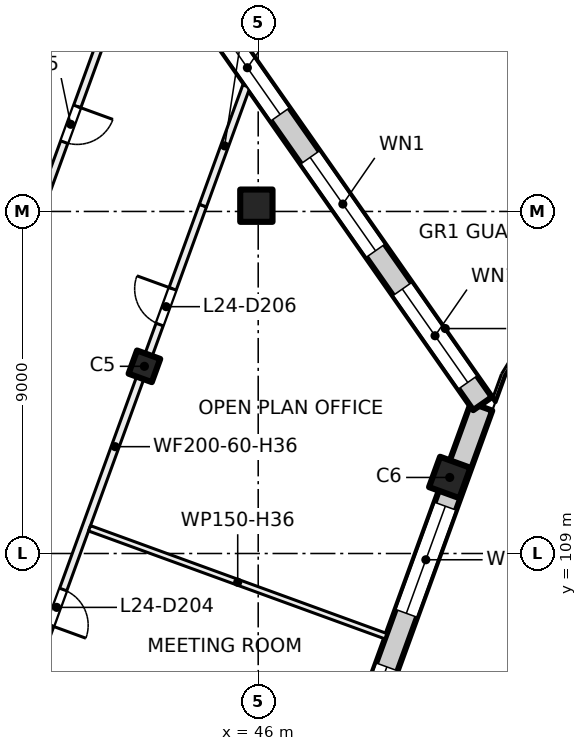
"""IFC4 building model, lengths in metres.
Left out: names, types, materials, properties, quantities, classifications, styles, units other than length and angle.
Written with IfcOpenShell. Run it as: python <this file> out.ifc"""

import sys

from ifc_helpers import new_model, si_unit, direction, frame, frame_2d, origin, origin_2d, place, context, subcontext, project, spatial, rectangle, extrude, element, fill, save


model = new_model("IFC4")
c1 = context("Model", 3, precision=1e-05, world=origin(), true_north=direction((0.0, 1.0)))
c2 = subcontext(c1, "Body", "Model", "MODEL_VIEW")
j1 = project(units=[si_unit("LENGTHUNIT", "METRE"), si_unit("PLANEANGLEUNIT", "RADIAN")], contexts=[c1])
p1 = place(None, origin())
s1 = spatial("IfcSite", under=j1, at=p1, CompositionType="ELEMENT")
p2 = place(p1, origin())
s2 = spatial("IfcBuilding", under=s1, at=p2, CompositionType="ELEMENT")
p3 = place(p2, frame((0.0, 0.0, 105.0)))
s3 = spatial("IfcBuildingStorey", under=s2, at=p3, CompositionType="ELEMENT", Elevation=105.0)
p4 = place(p3, frame((45.952, 118.152, 0.0), z_axis=(0.0, 0.0, 1.0), x_axis=(1.0, 0.0, 0.0)))
e1 = element("IfcColumn", 1, at=p4, inside=s3, PredefinedType="COLUMN", context=c2, shape_type="SweptSolid", body=[
    extrude(rectangle(XDim=0.85, YDim=0.85, at=origin_2d()), origin(), (0.0, 0.0, 1.0), 4.0),
])
p5 = place(p3, frame((43.006, 113.925, 0.0), z_axis=(0.0, 0.0, 1.0), x_axis=(-0.342020143326, -0.939692620786, 0.0)))
e2 = element("IfcColumn", 2, at=p5, inside=s3, PredefinedType="COLUMN", context=c2, shape_type="SweptSolid", body=[
    extrude(rectangle(XDim=0.65, YDim=0.65, at=origin_2d()), origin(), (0.0, 0.0, 1.0), 4.0),
])
p6 = place(p3, frame((51.04, 111.001, 0.0), z_axis=(0.0, 0.0, 1.0), x_axis=(-0.342020143326, -0.939692620786, 0.0)))
e3 = element("IfcColumn", 3, at=p6, inside=s3, PredefinedType="COLUMN", context=c2, shape_type="SweptSolid", body=[
    extrude(rectangle(XDim=0.85, YDim=0.85, at=origin_2d()), origin(), (0.0, 0.0, 1.0), 4.0),
])
p7 = place(p3, frame((58.083, 117.369, 0.0), z_axis=(0.0, 0.0, 1.0), x_axis=(-0.573573095716, 0.819154383416, 0.0)))
e4 = element("IfcWall", 4, at=p7, inside=s3, PredefinedType="SOLIDWALL", context=c2, shape_type="SweptSolid", body=[
    extrude(rectangle(XDim=26.037, YDim=0.6, at=frame_2d((13.019, 0.0))), origin(), (0.0, 0.0, 1.0), 3.625),
])
p8 = place(p7, frame((1.05, 0.0, 0.0)))
e5 = element("IfcOpeningElement", 5, at=p8, cuts=e4, PredefinedType="OPENING", context=c2, shape_type="SweptSolid", body=[
    extrude(rectangle(XDim=1.8, YDim=2.4, at=frame_2d((0.9, 1.2))), frame((0.0, 0.31, 0.0), z_axis=(0.0, -1.0, 0.0), x_axis=(1.0, 0.0, 0.0)), (0.0, 0.0, 1.0), 0.62),
])
p9 = place(p7, frame((4.829, 0.0, 0.9)))
e6 = element("IfcOpeningElement", 6, at=p9, cuts=e4, PredefinedType="OPENING", context=c2, shape_type="SweptSolid", body=[
    extrude(rectangle(XDim=3.0, YDim=2.4, at=frame_2d((1.5, 1.2))), frame((0.0, 0.31, 0.0), z_axis=(0.0, -1.0, 0.0), x_axis=(1.0, 0.0, 0.0)), (0.0, 0.0, 1.0), 0.62),
])
p10 = place(p7, frame((9.209, 0.0, 0.9)))
e7 = element("IfcOpeningElement", 7, at=p10, cuts=e4, PredefinedType="OPENING", context=c2, shape_type="SweptSolid", body=[
    extrude(rectangle(XDim=3.0, YDim=2.4, at=frame_2d((1.5, 1.2))), frame((0.0, 0.31, 0.0), z_axis=(0.0, -1.0, 0.0), x_axis=(1.0, 0.0, 0.0)), (0.0, 0.0, 1.0), 0.62),
])
p11 = place(p7, frame((13.588, 0.0, 0.9)))
e8 = element("IfcOpeningElement", 8, at=p11, cuts=e4, PredefinedType="OPENING", context=c2, shape_type="SweptSolid", body=[
    extrude(rectangle(XDim=3.0, YDim=2.4, at=frame_2d((1.5, 1.2))), frame((0.0, 0.31, 0.0), z_axis=(0.0, -1.0, 0.0), x_axis=(1.0, 0.0, 0.0)), (0.0, 0.0, 1.0), 0.62),
])
p12 = place(p7, frame((17.968, 0.0, 0.9)))
e9 = element("IfcOpeningElement", 9, at=p12, cuts=e4, PredefinedType="OPENING", context=c2, shape_type="SweptSolid", body=[
    extrude(rectangle(XDim=3.0, YDim=2.4, at=frame_2d((1.5, 1.2))), frame((0.0, 0.31, 0.0), z_axis=(0.0, -1.0, 0.0), x_axis=(1.0, 0.0, 0.0)), (0.0, 0.0, 1.0), 0.62),
])
p13 = place(p7, frame((22.198, 0.0, 0.9)))
e10 = element("IfcOpeningElement", 10, at=p13, cuts=e4, PredefinedType="OPENING", context=c2, shape_type="SweptSolid", body=[
    extrude(rectangle(XDim=3.0, YDim=2.4, at=frame_2d((1.5, 1.2))), frame((0.0, 0.31, 0.0), z_axis=(0.0, -1.0, 0.0), x_axis=(1.0, 0.0, 0.0)), (0.0, 0.0, 1.0), 0.62),
])
p14 = place(p3, frame((51.877, 112.862, 0.0), z_axis=(0.0, 0.0, 1.0), x_axis=(-0.342020589714, -0.939692458314, 0.0)))
e11 = element("IfcWall", 11, at=p14, inside=s3, PredefinedType="SOLIDWALL", context=c2, shape_type="SweptSolid", body=[
    extrude(rectangle(XDim=20.765, YDim=0.6, at=frame_2d((10.382, 0.0))), origin(), (0.0, 0.0, 1.0), 3.625),
])
p15 = place(p14, frame((2.785, 0.0, 0.9)))
e12 = element("IfcOpeningElement", 12, at=p15, cuts=e11, PredefinedType="OPENING", context=c2, shape_type="SweptSolid", body=[
    extrude(rectangle(XDim=3.0, YDim=2.4, at=frame_2d((1.5, 1.2))), frame((0.0, 0.31, 0.0), z_axis=(0.0, -1.0, 0.0), x_axis=(1.0, 0.0, 0.0)), (0.0, 0.0, 1.0), 0.62),
])
p16 = place(p14, frame((7.285, 0.0, 0.9)))
e13 = element("IfcOpeningElement", 13, at=p16, cuts=e11, PredefinedType="OPENING", context=c2, shape_type="SweptSolid", body=[
    extrude(rectangle(XDim=3.0, YDim=2.4, at=frame_2d((1.5, 1.2))), frame((0.0, 0.31, 0.0), z_axis=(0.0, -1.0, 0.0), x_axis=(1.0, 0.0, 0.0)), (0.0, 0.0, 1.0), 0.62),
])
p17 = place(p14, frame((11.785, 0.0, 0.9)))
e14 = element("IfcOpeningElement", 14, at=p17, cuts=e11, PredefinedType="OPENING", context=c2, shape_type="SweptSolid", body=[
    extrude(rectangle(XDim=3.0, YDim=2.4, at=frame_2d((1.5, 1.2))), frame((0.0, 0.31, 0.0), z_axis=(0.0, -1.0, 0.0), x_axis=(1.0, 0.0, 0.0)), (0.0, 0.0, 1.0), 0.62),
])
p18 = place(p14, frame((16.285, 0.0, 0.9)))
e15 = element("IfcOpeningElement", 15, at=p18, cuts=e11, PredefinedType="OPENING", context=c2, shape_type="SweptSolid", body=[
    extrude(rectangle(XDim=3.0, YDim=2.4, at=frame_2d((1.5, 1.2))), frame((0.0, 0.31, 0.0), z_axis=(0.0, -1.0, 0.0), x_axis=(1.0, 0.0, 0.0)), (0.0, 0.0, 1.0), 0.62),
])
p19 = place(p3, frame((36.923, 134.338, 0.0), z_axis=(0.0, 0.0, 1.0), x_axis=(0.573575266068, -0.819152863729, 0.0)))
e16 = element("IfcWall", 16, at=p19, inside=s3, PredefinedType="SOLIDWALL", context=c2, shape_type="SweptSolid", body=[
    extrude(rectangle(XDim=26.117, YDim=0.6, at=frame_2d((13.059, 0.0))), origin(), (0.0, 0.0, 1.0), 3.625),
])
p20 = place(p19, frame((0.84, 0.0, 0.9)))
e17 = element("IfcOpeningElement", 17, at=p20, cuts=e16, PredefinedType="OPENING", context=c2, shape_type="SweptSolid", body=[
    extrude(rectangle(XDim=3.0, YDim=2.4, at=frame_2d((1.5, 1.2))), frame((0.0, 0.31, 0.0), z_axis=(0.0, -1.0, 0.0), x_axis=(1.0, 0.0, 0.0)), (0.0, 0.0, 1.0), 0.62),
])
p21 = place(p19, frame((5.669, 0.0, 0.0)))
e18 = element("IfcOpeningElement", 18, at=p21, cuts=e16, PredefinedType="OPENING", context=c2, shape_type="SweptSolid", body=[
    extrude(rectangle(XDim=1.8, YDim=2.4, at=frame_2d((0.9, 1.2))), frame((0.0, 0.31, 0.0), z_axis=(0.0, -1.0, 0.0), x_axis=(1.0, 0.0, 0.0)), (0.0, 0.0, 1.0), 0.62),
])
p22 = place(p19, frame((9.449, 0.0, 0.9)))
e19 = element("IfcOpeningElement", 19, at=p22, cuts=e16, PredefinedType="OPENING", context=c2, shape_type="SweptSolid", body=[
    extrude(rectangle(XDim=3.0, YDim=2.4, at=frame_2d((1.5, 1.2))), frame((0.0, 0.31, 0.0), z_axis=(0.0, -1.0, 0.0), x_axis=(1.0, 0.0, 0.0)), (0.0, 0.0, 1.0), 0.62),
])
p23 = place(p19, frame((13.829, 0.0, 0.9)))
e20 = element("IfcOpeningElement", 20, at=p23, cuts=e16, PredefinedType="OPENING", context=c2, shape_type="SweptSolid", body=[
    extrude(rectangle(XDim=3.0, YDim=2.4, at=frame_2d((1.5, 1.2))), frame((0.0, 0.31, 0.0), z_axis=(0.0, -1.0, 0.0), x_axis=(1.0, 0.0, 0.0)), (0.0, 0.0, 1.0), 0.62),
])
p24 = place(p19, frame((18.208, 0.0, 0.9)))
e21 = element("IfcOpeningElement", 21, at=p24, cuts=e16, PredefinedType="OPENING", context=c2, shape_type="SweptSolid", body=[
    extrude(rectangle(XDim=3.0, YDim=2.4, at=frame_2d((1.5, 1.2))), frame((0.0, 0.31, 0.0), z_axis=(0.0, -1.0, 0.0), x_axis=(1.0, 0.0, 0.0)), (0.0, 0.0, 1.0), 0.62),
])
p25 = place(p19, frame((22.438, 0.0, 0.9)))
e22 = element("IfcOpeningElement", 22, at=p25, cuts=e16, PredefinedType="OPENING", context=c2, shape_type="SweptSolid", body=[
    extrude(rectangle(XDim=3.0, YDim=2.4, at=frame_2d((1.5, 1.2))), frame((0.0, 0.31, 0.0), z_axis=(0.0, -1.0, 0.0), x_axis=(1.0, 0.0, 0.0)), (0.0, 0.0, 1.0), 0.62),
])
p26 = place(p3, frame((36.169, 106.836, 0.0), z_axis=(0.0, 0.0, 1.0), x_axis=(0.341992433067, 0.939702706033, 0.0)))
e23 = element("IfcWall", 23, at=p26, inside=s3, PredefinedType="PARTITIONING", context=c2, shape_type="SweptSolid", body=[
    extrude(rectangle(XDim=18.0, YDim=0.2, at=frame_2d((9.0, 0.0))), origin(), (0.0, 0.0, 1.0), 3.625),
])
p27 = place(p26, frame((4.0, 0.0, 0.0)))
e24 = element("IfcOpeningElement", 24, at=p27, cuts=e23, PredefinedType="OPENING", context=c2, shape_type="SweptSolid", body=[
    extrude(rectangle(XDim=1.0, YDim=2.1, at=frame_2d((0.5, 1.05))), frame((0.0, 0.11, 0.0), z_axis=(0.0, -1.0, 0.0), x_axis=(1.0, 0.0, 0.0)), (0.0, 0.0, 1.0), 0.22),
])
p28 = place(p26, frame((13.821, 0.0, 0.0)))
e25 = element("IfcOpeningElement", 25, at=p28, cuts=e23, PredefinedType="OPENING", context=c2, shape_type="SweptSolid", body=[
    extrude(rectangle(XDim=1.0, YDim=2.1, at=frame_2d((0.5, 1.05))), frame((0.0, 0.11, 0.0), z_axis=(0.0, -1.0, 0.0), x_axis=(1.0, 0.0, 0.0)), (0.0, 0.0, 1.0), 0.22),
])
p29 = place(p3, frame((44.545, 118.154, 0.0), z_axis=(0.0, 0.0, 1.0), x_axis=(-0.341994252555, -0.939702043852, 0.0)))
e26 = element("IfcWall", 26, at=p29, inside=s3, PredefinedType="PARTITIONING", context=c2, shape_type="SweptSolid", body=[
    extrude(rectangle(XDim=13.5, YDim=0.2, at=frame_2d((6.75, 0.0))), origin(), (0.0, 0.0, 1.0), 3.625),
])
p30 = place(p29, frame((10.75, 0.0, 0.0)))
e27 = element("IfcOpeningElement", 27, at=p30, cuts=e26, PredefinedType="OPENING", context=c2, shape_type="SweptSolid", body=[
    extrude(rectangle(XDim=1.0, YDim=2.1, at=frame_2d((0.5, 1.05))), frame((0.0, 0.11, 0.0), z_axis=(0.0, -1.0, 0.0), x_axis=(1.0, 0.0, 0.0)), (0.0, 0.0, 1.0), 0.22),
])
p31 = place(p29, frame((2.33, 0.0, 0.0)))
e28 = element("IfcOpeningElement", 28, at=p31, cuts=e26, PredefinedType="OPENING", context=c2, shape_type="SweptSolid", body=[
    extrude(rectangle(XDim=1.0, YDim=2.1, at=frame_2d((0.5, 1.05))), frame((0.0, 0.11, 0.0), z_axis=(0.0, -1.0, 0.0), x_axis=(1.0, 0.0, 0.0)), (0.0, 0.0, 1.0), 0.22),
])
p32 = place(p3, frame((41.561, 109.663, 0.0), z_axis=(0.0, 0.0, 1.0), x_axis=(0.939673986983, -0.342071334939, 0.0)))
e29 = element("IfcWall", 29, at=p32, inside=s3, PredefinedType="PARTITIONING", context=c2, shape_type="SweptSolid", body=[
    extrude(rectangle(XDim=8.3, YDim=0.15, at=frame_2d((4.15, 0.0))), origin(), (0.0, 0.0, 1.0), 3.625),
])
p33 = place(p3, frame((44.545, 118.154, 0.0), z_axis=(0.0, 0.0, 1.0), x_axis=(0.342153412926, 0.939644103915, 0.0)))
e30 = element("IfcWall", 30, at=p33, inside=s3, PredefinedType="PARTITIONING", context=c2, shape_type="SweptSolid", body=[
    extrude(rectangle(XDim=3.344, YDim=0.2, at=frame_2d((1.672, 0.0))), origin(), (0.0, 0.0, 1.0), 2.825),
])
p34 = place(p15, origin())
e31 = element("IfcWindow", 31, at=p34, inside=s3, PartitioningType="SINGLE_PANEL", PredefinedType="WINDOW", context=c2, shape_type="SweptSolid", body=[
    extrude(rectangle(XDim=3.0, YDim=2.4, at=frame_2d((1.5, 1.2))), frame((0.0, 0.03, 0.0), z_axis=(0.0, -1.0, 0.0), x_axis=(1.0, 0.0, 0.0)), (0.0, 0.0, 1.0), 0.06),
])
fill(e12, e31)
p35 = place(p16, origin())
e32 = element("IfcWindow", 32, at=p35, inside=s3, PartitioningType="SINGLE_PANEL", PredefinedType="WINDOW", context=c2, shape_type="SweptSolid", body=[
    extrude(rectangle(XDim=3.0, YDim=2.4, at=frame_2d((1.5, 1.2))), frame((0.0, 0.03, 0.0), z_axis=(0.0, -1.0, 0.0), x_axis=(1.0, 0.0, 0.0)), (0.0, 0.0, 1.0), 0.06),
])
fill(e13, e32)
p36 = place(p23, origin())
e33 = element("IfcWindow", 33, at=p36, inside=s3, PartitioningType="SINGLE_PANEL", PredefinedType="WINDOW", context=c2, shape_type="SweptSolid", body=[
    extrude(rectangle(XDim=3.0, YDim=2.4, at=frame_2d((1.5, 1.2))), frame((0.0, 0.03, 0.0), z_axis=(0.0, -1.0, 0.0), x_axis=(1.0, 0.0, 0.0)), (0.0, 0.0, 1.0), 0.06),
])
fill(e20, e33)
p37 = place(p24, origin())
e34 = element("IfcWindow", 34, at=p37, inside=s3, PartitioningType="SINGLE_PANEL", PredefinedType="WINDOW", context=c2, shape_type="SweptSolid", body=[
    extrude(rectangle(XDim=3.0, YDim=2.4, at=frame_2d((1.5, 1.2))), frame((0.0, 0.03, 0.0), z_axis=(0.0, -1.0, 0.0), x_axis=(1.0, 0.0, 0.0)), (0.0, 0.0, 1.0), 0.06),
])
fill(e21, e34)
p38 = place(p25, origin())
e35 = element("IfcWindow", 35, at=p38, inside=s3, PartitioningType="SINGLE_PANEL", PredefinedType="WINDOW", context=c2, shape_type="SweptSolid", body=[
    extrude(rectangle(XDim=3.0, YDim=2.4, at=frame_2d((1.5, 1.2))), frame((0.0, 0.03, 0.0), z_axis=(0.0, -1.0, 0.0), x_axis=(1.0, 0.0, 0.0)), (0.0, 0.0, 1.0), 0.06),
])
fill(e22, e35)
p39 = place(p30, origin())
e36 = element("IfcDoor", 36, at=p39, inside=s3, OperationType="SINGLE_SWING_RIGHT", PredefinedType="DOOR", context=c2, shape_type="SweptSolid", body=[
    extrude(rectangle(XDim=1.0, YDim=2.1, at=frame_2d((0.5, 1.05))), frame((0.0, 0.025, 0.0), z_axis=(0.0, -1.0, 0.0), x_axis=(1.0, 0.0, 0.0)), (0.0, 0.0, 1.0), 0.05),
])
fill(e27, e36)
p40 = place(p28, origin())
e37 = element("IfcDoor", 37, at=p40, inside=s3, OperationType="SINGLE_SWING_RIGHT", PredefinedType="DOOR", context=c2, shape_type="SweptSolid", body=[
    extrude(rectangle(XDim=1.0, YDim=2.1, at=frame_2d((0.5, 1.05))), frame((0.0, 0.025, 0.0), z_axis=(0.0, -1.0, 0.0), x_axis=(1.0, 0.0, 0.0)), (0.0, 0.0, 1.0), 0.05),
])
fill(e25, e37)
p41 = place(p31, origin())
e38 = element("IfcDoor", 38, at=p41, inside=s3, OperationType="SINGLE_SWING_LEFT", PredefinedType="DOOR", context=c2, shape_type="SweptSolid", body=[
    extrude(rectangle(XDim=1.0, YDim=2.1, at=frame_2d((0.5, 1.05))), frame((0.0, 0.025, 0.0), z_axis=(0.0, -1.0, 0.0), x_axis=(1.0, 0.0, 0.0)), (0.0, 0.0, 1.0), 0.05),
])
fill(e28, e38)
save(model, sys.argv[1])
